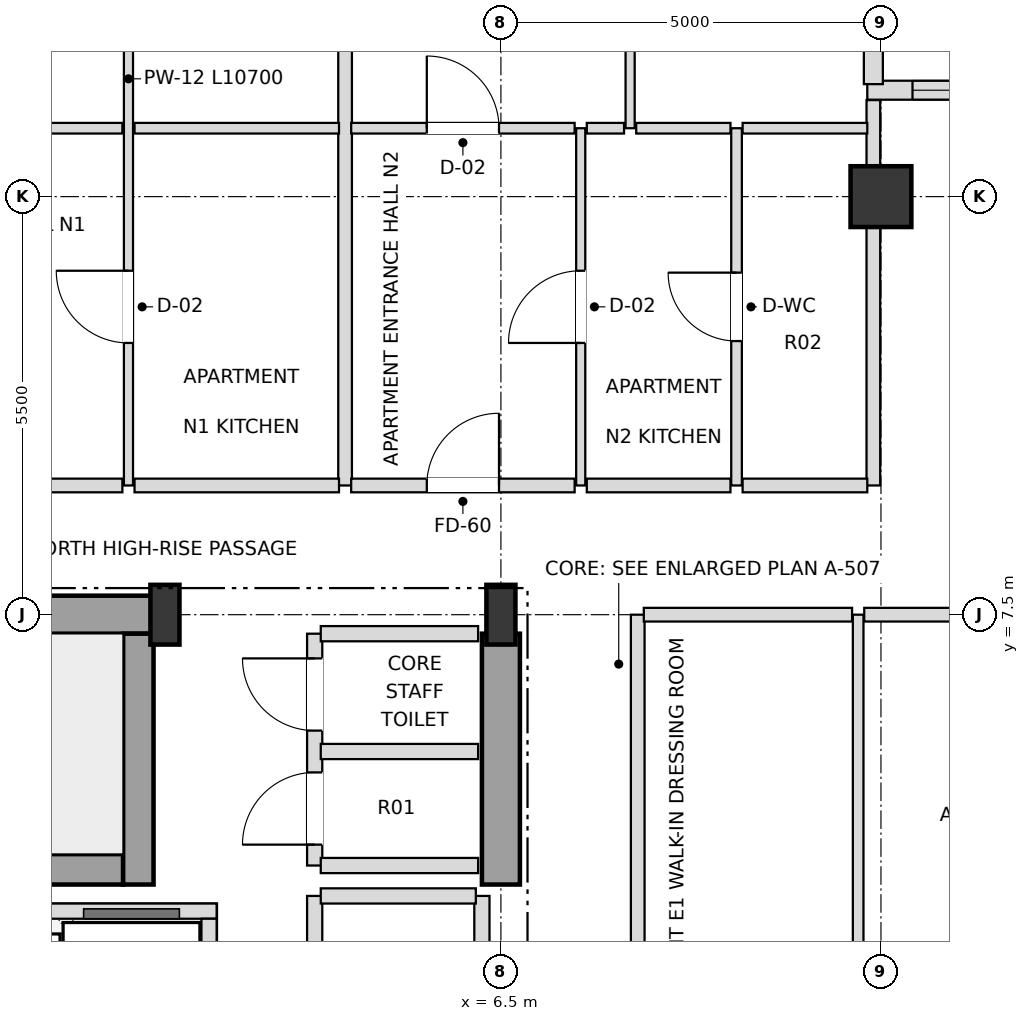
"""IFC4 building model, lengths in metres.
Left out: names, types, materials, properties, quantities, classifications, styles, units other than length and angle.
Written with IfcOpenShell. Run it as: python <this file> out.ifc"""

import sys

from ifc_helpers import new_model, si_unit, direction, frame, frame_2d, origin, origin_2d, place, context, subcontext, project, spatial, rectangle, i_section, extrude, element, fill, save


model = new_model("IFC4")
c1 = context("Model", 3, precision=1e-05, world=origin(), true_north=direction((0.0, 1.0)))
c2 = subcontext(c1, "Body", "Model", "MODEL_VIEW")
j1 = project(units=[si_unit("LENGTHUNIT", "METRE"), si_unit("PLANEANGLEUNIT", "RADIAN")], contexts=[c1])
p1 = place(None, origin())
s1 = spatial("IfcSite", under=j1, at=p1, CompositionType="ELEMENT")
p2 = place(p1, origin())
s2 = spatial("IfcBuilding", under=s1, at=p2, CompositionType="ELEMENT")
p3 = place(p2, frame((0.0, 0.0, 254.7)))
s3 = spatial("IfcBuildingStorey", under=s2, at=p3, CompositionType="ELEMENT", Elevation=254.7)
for number, where, z_axis, x_axis in (
    (1, (2.08, 7.5, 0.0), (0.0, 0.0, 1.0), (1.0, 0.0, 0.0)),
    (2, (6.5, 7.5, 0.0), (0.0, 0.0, 1.0), (1.0, 0.0, 0.0)),
):
    element("IfcColumn", number, at=place(p3, frame(where, z_axis=z_axis, x_axis=x_axis)), inside=s3, PredefinedType="COLUMN", context=c2, shape_type="SweptSolid", body=[
        extrude(i_section(OverallWidth=0.382, OverallDepth=0.786, WebThickness=0.02, FlangeThickness=0.033, at=origin_2d()), origin(), (0.0, 0.0, 1.0), 3.6),
    ])
p4 = place(p3, frame((11.5, 13.0, 0.0), z_axis=(0.0, 0.0, 1.0), x_axis=(1.0, 0.0, 0.0)))
e3 = element("IfcColumn", 3, at=p4, inside=s3, PredefinedType="COLUMN", context=c2, shape_type="SweptSolid", body=[
    extrude(rectangle(XDim=0.8, YDim=0.8, at=origin_2d()), origin(), (0.0, 0.0, 1.0), 3.6),
])
p5 = place(p3, frame((16.98, 14.4, 0.0), z_axis=(0.0, 0.0, 1.0), x_axis=(-1.0, 0.0, 0.0)))
e4 = element("IfcWall", 4, at=p5, inside=s3, PredefinedType="SOLIDWALL", context=c2, shape_type="SweptSolid", body=[
    extrude(rectangle(XDim=5.66, YDim=0.25, at=frame_2d((2.83, 0.0))), origin(), (0.0, 0.0, 1.0), 2.748),
])
p6 = place(p5, frame((0.595, 0.0, 0.72)))
e5 = element("IfcOpeningElement", 5, at=p6, cuts=e4, PredefinedType="OPENING", context=c2, shape_type="SweptSolid", body=[
    extrude(rectangle(XDim=1.8, YDim=1.68, at=frame_2d((0.9, 0.84))), frame((0.0, 0.135, 0.0), z_axis=(0.0, -1.0, 0.0), x_axis=(1.0, 0.0, 0.0)), (0.0, 0.0, 1.0), 0.27),
])
p7 = place(p5, frame((3.265, 0.0, 0.72)))
e6 = element("IfcOpeningElement", 6, at=p7, cuts=e4, PredefinedType="OPENING", context=c2, shape_type="SweptSolid", body=[
    extrude(rectangle(XDim=1.8, YDim=1.68, at=frame_2d((0.9, 0.84))), frame((0.0, 0.135, 0.0), z_axis=(0.0, -1.0, 0.0), x_axis=(1.0, 0.0, 0.0)), (0.0, 0.0, 1.0), 0.27),
])
p8 = place(p3, frame((11.4, 14.48, 0.0), z_axis=(0.0, 0.0, 1.0), x_axis=(0.0, 1.0, 0.0)))
e7 = element("IfcWall", 7, at=p8, inside=s3, PredefinedType="SOLIDWALL", context=c2, shape_type="SweptSolid", body=[
    extrude(rectangle(XDim=5.34, YDim=0.25, at=frame_2d((2.67, 0.0))), origin(), (0.0, 0.0, 1.0), 2.748),
])
p9 = place(p8, frame((1.615, 0.0, 0.72)))
e8 = element("IfcOpeningElement", 8, at=p9, cuts=e7, PredefinedType="OPENING", context=c2, shape_type="SweptSolid", body=[
    extrude(rectangle(XDim=1.8, YDim=1.68, at=frame_2d((0.9, 0.84))), frame((0.0, 0.135, 0.0), z_axis=(0.0, -1.0, 0.0), x_axis=(1.0, 0.0, 0.0)), (0.0, 0.0, 1.0), 0.27),
])
p10 = place(p3, frame((0.0, 7.5, 0.0), z_axis=(0.0, 0.0, 1.0), x_axis=(1.0, 0.0, 0.0)))
e9 = element("IfcWall", 9, at=p10, inside=s3, PredefinedType="SHEAR", context=c2, shape_type="SweptSolid", body=[
    extrude(rectangle(XDim=2.08, YDim=0.5, at=frame_2d((1.04, 0.0))), origin(), (0.0, 0.0, 1.0), 3.38),
])
p11 = place(p3, frame((6.5, 3.95, 0.0), z_axis=(0.0, 0.0, 1.0), x_axis=(0.0, 1.0, 0.0)))
e10 = element("IfcWall", 10, at=p11, inside=s3, PredefinedType="SHEAR", context=c2, shape_type="SweptSolid", body=[
    extrude(rectangle(XDim=3.3, YDim=0.5, at=frame_2d((1.65, 0.0))), origin(), (0.0, 0.0, 1.0), 3.38),
])
p12 = place(p3, frame((-5.55, 4.15, 0.0), z_axis=(0.0, 0.0, 1.0), x_axis=(1.0, 0.0, 0.0)))
e11 = element("IfcWall", 11, at=p12, inside=s3, PredefinedType="SHEAR", context=c2, shape_type="SweptSolid", body=[
    extrude(rectangle(XDim=7.08, YDim=0.4, at=frame_2d((3.54, 0.0))), origin(), (0.0, 0.0, 1.0), 3.38),
])
p13 = place(p3, frame((1.73, 3.95, 0.0), z_axis=(0.0, 0.0, 1.0), x_axis=(0.0, 1.0, 0.0)))
e12 = element("IfcWall", 12, at=p13, inside=s3, PredefinedType="SHEAR", context=c2, shape_type="SweptSolid", body=[
    extrude(rectangle(XDim=3.3, YDim=0.4, at=frame_2d((1.65, 0.0))), origin(), (0.0, 0.0, 1.0), 3.38),
])
p14 = place(p3, frame((-2.82, 3.6, 0.0), z_axis=(0.0, 0.0, 1.0), x_axis=(1.0, 0.0, 0.0)))
e13 = element("IfcWall", 13, at=p14, inside=s3, PredefinedType="SOLIDWALL", context=c2, shape_type="SweptSolid", body=[
    extrude(rectangle(XDim=5.58, YDim=0.2, at=frame_2d((2.79, 0.0))), origin(), (0.0, 0.0, 1.0), 3.38),
])
p15 = place(p3, frame((2.66, 1.0, 0.0), z_axis=(0.0, 0.0, 1.0), x_axis=(0.0, 1.0, 0.0)))
e14 = element("IfcWall", 14, at=p15, inside=s3, PredefinedType="SOLIDWALL", context=c2, shape_type="SweptSolid", body=[
    extrude(rectangle(XDim=2.5, YDim=0.2, at=frame_2d((1.25, 0.0))), origin(), (0.0, 0.0, 1.0), 3.38),
])
p16 = place(p3, frame((1.6, 9.2, 0.0), z_axis=(0.0, 0.0, 1.0), x_axis=(0.0, 1.0, 0.0)))
e15 = element("IfcWall", 15, at=p16, inside=s3, PredefinedType="PARTITIONING", context=c2, shape_type="SweptSolid", body=[
    extrude(rectangle(XDim=10.7, YDim=0.12, at=frame_2d((5.35, 0.0))), origin(), (0.0, 0.0, 1.0), 3.018),
])
p17 = place(p16, frame((1.875, 0.0, 0.0)))
e16 = element("IfcOpeningElement", 16, at=p17, cuts=e15, PredefinedType="OPENING", context=c2, shape_type="SweptSolid", body=[
    extrude(rectangle(XDim=0.95, YDim=2.1, at=frame_2d((0.475, 1.05))), frame((0.0, 0.07, 0.0), z_axis=(0.0, -1.0, 0.0), x_axis=(1.0, 0.0, 0.0)), (0.0, 0.0, 1.0), 0.14),
])
p18 = place(p16, frame((7.25, 0.0, 0.0)))
e17 = element("IfcOpeningElement", 17, at=p18, cuts=e15, PredefinedType="OPENING", context=c2, shape_type="SweptSolid", body=[
    extrude(rectangle(XDim=0.9, YDim=2.1, at=frame_2d((0.45, 1.05))), frame((0.0, 0.07, 0.0), z_axis=(0.0, -1.0, 0.0), x_axis=(1.0, 0.0, 0.0)), (0.0, 0.0, 1.0), 0.14),
])
p19 = place(p3, frame((4.05, -1.35, 0.0), z_axis=(0.0, 0.0, 1.0), x_axis=(0.0, 1.0, 0.0)))
e18 = element("IfcWall", 18, at=p19, inside=s3, PredefinedType="SOLIDWALL", context=c2, shape_type="SweptSolid", body=[
    extrude(rectangle(XDim=5.15, YDim=0.2, at=frame_2d((2.575, 0.0))), origin(), (0.0, 0.0, 1.0), 3.38),
])
p20 = place(p19, frame((0.475, 0.0, 0.0)))
e19 = element("IfcOpeningElement", 19, at=p20, cuts=e18, PredefinedType="OPENING", context=c2, shape_type="SweptSolid", body=[
    extrude(rectangle(XDim=0.95, YDim=2.15, at=frame_2d((0.475, 1.075))), frame((0.0, 0.11, 0.0), z_axis=(0.0, -1.0, 0.0), x_axis=(1.0, 0.0, 0.0)), (0.0, 0.0, 1.0), 0.22),
])
p21 = place(p19, frame((3.025, 0.0, 0.0)))
e20 = element("IfcOpeningElement", 20, at=p21, cuts=e18, PredefinedType="OPENING", context=c2, shape_type="SweptSolid", body=[
    extrude(rectangle(XDim=0.95, YDim=2.15, at=frame_2d((0.475, 1.075))), frame((0.0, 0.11, 0.0), z_axis=(0.0, -1.0, 0.0), x_axis=(1.0, 0.0, 0.0)), (0.0, 0.0, 1.0), 0.22),
])
p22 = place(p3, frame((4.05, 4.2, 0.0), z_axis=(0.0, 0.0, 1.0), x_axis=(0.0, 1.0, 0.0)))
e21 = element("IfcWall", 21, at=p22, inside=s3, PredefinedType="SOLIDWALL", context=c2, shape_type="SweptSolid", body=[
    extrude(rectangle(XDim=3.05, YDim=0.2, at=frame_2d((1.525, 0.0))), origin(), (0.0, 0.0, 1.0), 3.38),
])
p23 = place(p22, frame((0.275, 0.0, 0.0)))
e22 = element("IfcOpeningElement", 22, at=p23, cuts=e21, PredefinedType="OPENING", context=c2, shape_type="SweptSolid", body=[
    extrude(rectangle(XDim=0.95, YDim=2.15, at=frame_2d((0.475, 1.075))), frame((0.0, 0.11, 0.0), z_axis=(0.0, -1.0, 0.0), x_axis=(1.0, 0.0, 0.0)), (0.0, 0.0, 1.0), 0.22),
])
p24 = place(p22, frame((1.775, 0.0, 0.0)))
e23 = element("IfcOpeningElement", 23, at=p24, cuts=e21, PredefinedType="OPENING", context=c2, shape_type="SweptSolid", body=[
    extrude(rectangle(XDim=0.95, YDim=2.15, at=frame_2d((0.475, 1.075))), frame((0.0, 0.11, 0.0), z_axis=(0.0, -1.0, 0.0), x_axis=(1.0, 0.0, 0.0)), (0.0, 0.0, 1.0), 0.22),
])
p25 = place(p3, frame((4.45, 9.2, 0.0), z_axis=(0.0, 0.0, 1.0), x_axis=(0.0, 1.0, 0.0)))
e24 = element("IfcWall", 24, at=p25, inside=s3, PredefinedType="PARTITIONING", context=c2, shape_type="SweptSolid", body=[
    extrude(rectangle(XDim=10.7, YDim=0.18, at=frame_2d((5.35, 0.0))), origin(), (0.0, 0.0, 1.0), 3.018),
])
p26 = place(p3, frame((6.25, -1.35, 0.0), z_axis=(0.0, 0.0, 1.0), x_axis=(0.0, 1.0, 0.0)))
e25 = element("IfcWall", 25, at=p26, inside=s3, PredefinedType="SOLIDWALL", context=c2, shape_type="SweptSolid", body=[
    extrude(rectangle(XDim=5.15, YDim=0.2, at=frame_2d((2.575, 0.0))), origin(), (0.0, 0.0, 1.0), 3.38),
])
p27 = place(p3, frame((7.55, 9.2, 0.0), z_axis=(0.0, 0.0, 1.0), x_axis=(0.0, 1.0, 0.0)))
e26 = element("IfcWall", 26, at=p27, inside=s3, PredefinedType="PARTITIONING", context=c2, shape_type="SweptSolid", body=[
    extrude(rectangle(XDim=4.7, YDim=0.12, at=frame_2d((2.35, 0.0))), origin(), (0.0, 0.0, 1.0), 2.826),
])
p28 = place(p27, frame((1.875, 0.0, 0.0)))
e27 = element("IfcOpeningElement", 27, at=p28, cuts=e26, PredefinedType="OPENING", context=c2, shape_type="SweptSolid", body=[
    extrude(rectangle(XDim=0.95, YDim=2.1, at=frame_2d((0.475, 1.05))), frame((0.0, 0.07, 0.0), z_axis=(0.0, -1.0, 0.0), x_axis=(1.0, 0.0, 0.0)), (0.0, 0.0, 1.0), 0.14),
])
p29 = place(p3, frame((8.2, 13.9, 0.0), z_axis=(0.0, 0.0, 1.0), x_axis=(0.0, 1.0, 0.0)))
e28 = element("IfcWall", 28, at=p29, inside=s3, PredefinedType="PARTITIONING", context=c2, shape_type="SweptSolid", body=[
    extrude(rectangle(XDim=6.0, YDim=0.12, at=frame_2d((3.0, 0.0))), origin(), (0.0, 0.0, 1.0), 3.38),
])
p30 = place(p29, frame((2.55, 0.0, 0.0)))
e29 = element("IfcOpeningElement", 29, at=p30, cuts=e28, PredefinedType="OPENING", context=c2, shape_type="SweptSolid", body=[
    extrude(rectangle(XDim=0.9, YDim=2.1, at=frame_2d((0.45, 1.05))), frame((0.0, 0.07, 0.0), z_axis=(0.0, -1.0, 0.0), x_axis=(1.0, 0.0, 0.0)), (0.0, 0.0, 1.0), 0.14),
])
p31 = place(p3, frame((8.3, -7.5, 0.0), z_axis=(0.0, 0.0, 1.0), x_axis=(0.0, 1.0, 0.0)))
e30 = element("IfcWall", 30, at=p31, inside=s3, PredefinedType="PARTITIONING", context=c2, shape_type="SweptSolid", body=[
    extrude(rectangle(XDim=15.0, YDim=0.18, at=frame_2d((7.5, 0.0))), origin(), (0.0, 0.0, 1.0), 3.38),
])
p32 = place(p31, frame((2.355, 0.0, 0.0)))
e31 = element("IfcOpeningElement", 31, at=p32, cuts=e30, PredefinedType="OPENING", context=c2, shape_type="SweptSolid", body=[
    extrude(rectangle(XDim=0.95, YDim=2.15, at=frame_2d((0.475, 1.075))), frame((0.0, 0.1, 0.0), z_axis=(0.0, -1.0, 0.0), x_axis=(1.0, 0.0, 0.0)), (0.0, 0.0, 1.0), 0.2),
])
p33 = place(p3, frame((9.6, 9.2, 0.0), z_axis=(0.0, 0.0, 1.0), x_axis=(0.0, 1.0, 0.0)))
e32 = element("IfcWall", 32, at=p33, inside=s3, PredefinedType="PARTITIONING", context=c2, shape_type="SweptSolid", body=[
    extrude(rectangle(XDim=4.7, YDim=0.14, at=frame_2d((2.35, 0.0))), origin(), (0.0, 0.0, 1.0), 2.826),
])
p34 = place(p33, frame((1.9, 0.0, 0.0)))
e33 = element("IfcOpeningElement", 33, at=p34, cuts=e32, PredefinedType="OPENING", context=c2, shape_type="SweptSolid", body=[
    extrude(rectangle(XDim=0.9, YDim=2.1, at=frame_2d((0.45, 1.05))), frame((0.0, 0.08, 0.0), z_axis=(0.0, -1.0, 0.0), x_axis=(1.0, 0.0, 0.0)), (0.0, 0.0, 1.0), 0.16),
])
p35 = place(p3, frame((11.2, -7.5, 0.0), z_axis=(0.0, 0.0, 1.0), x_axis=(0.0, 1.0, 0.0)))
e34 = element("IfcWall", 34, at=p35, inside=s3, PredefinedType="PARTITIONING", context=c2, shape_type="SweptSolid", body=[
    extrude(rectangle(XDim=15.0, YDim=0.14, at=frame_2d((7.5, 0.0))), origin(), (0.0, 0.0, 1.0), 3.38),
])
p36 = place(p35, frame((3.475, 0.0, 0.0)))
e35 = element("IfcOpeningElement", 35, at=p36, cuts=e34, PredefinedType="OPENING", context=c2, shape_type="SweptSolid", body=[
    extrude(rectangle(XDim=0.95, YDim=2.1, at=frame_2d((0.475, 1.05))), frame((0.0, 0.08, 0.0), z_axis=(0.0, -1.0, 0.0), x_axis=(1.0, 0.0, 0.0)), (0.0, 0.0, 1.0), 0.16),
])
p37 = place(p3, frame((11.4, 9.2, 0.0), z_axis=(0.0, 0.0, 1.0), x_axis=(0.0, 1.0, 0.0)))
e36 = element("IfcWall", 36, at=p37, inside=s3, PredefinedType="PARTITIONING", context=c2, shape_type="SweptSolid", body=[
    extrude(rectangle(XDim=5.07, YDim=0.18, at=frame_2d((2.535, 0.0))), origin(), (0.0, 0.0, 1.0), 2.748),
])
p38 = place(p3, frame((4.13, 3.8, 0.0), z_axis=(0.0, 0.0, 1.0), x_axis=(1.0, 0.0, 0.0)))
e37 = element("IfcWall", 37, at=p38, inside=s3, PredefinedType="SOLIDWALL", context=c2, shape_type="SweptSolid", body=[
    extrude(rectangle(XDim=2.04, YDim=0.2, at=frame_2d((1.02, 0.0))), origin(), (0.0, 0.0, 1.0), 3.38),
])
for number, where, z_axis, x_axis in (
    (38, (4.13, 4.2, 0.0), (0.0, 0.0, 1.0), (1.0, 0.0, 0.0)),
    (39, (4.13, 5.7, 0.0), (0.0, 0.0, 1.0), (1.0, 0.0, 0.0)),
    (40, (4.13, 7.25, 0.0), (0.0, 0.0, 1.0), (1.0, 0.0, 0.0)),
):
    element("IfcWall", number, at=place(p3, frame(where, z_axis=z_axis, x_axis=x_axis)), inside=s3, PredefinedType="SOLIDWALL", context=c2, shape_type="SweptSolid", body=[
        extrude(rectangle(XDim=2.07, YDim=0.2, at=frame_2d((1.035, 0.0))), origin(), (0.0, 0.0, 1.0), 3.38),
    ])
p39 = place(p3, frame((8.38, 7.5, 0.0), z_axis=(0.0, 0.0, 1.0), x_axis=(1.0, 0.0, 0.0)))
e41 = element("IfcWall", 41, at=p39, inside=s3, PredefinedType="PARTITIONING", context=c2, shape_type="SweptSolid", body=[
    extrude(rectangle(XDim=2.74, YDim=0.18, at=frame_2d((1.37, 0.0))), origin(), (0.0, 0.0, 1.0), 2.826),
])
p40 = place(p3, frame((11.28, 7.5, 0.0), z_axis=(0.0, 0.0, 1.0), x_axis=(1.0, 0.0, 0.0)))
e42 = element("IfcWall", 42, at=p40, inside=s3, PredefinedType="PARTITIONING", context=c2, shape_type="SweptSolid", body=[
    extrude(rectangle(XDim=5.62, YDim=0.18, at=frame_2d((2.81, 0.0))), origin(), (0.0, 0.0, 1.0), 2.826),
])
p41 = place(p3, frame((-4.47, 9.2, 0.0), z_axis=(0.0, 0.0, 1.0), x_axis=(1.0, 0.0, 0.0)))
e43 = element("IfcWall", 43, at=p41, inside=s3, PredefinedType="PARTITIONING", context=c2, shape_type="SweptSolid", body=[
    extrude(rectangle(XDim=5.99, YDim=0.18, at=frame_2d((2.995, 0.0))), origin(), (0.0, 0.0, 1.0), 3.38),
])
p42 = place(p41, frame((2.525, 0.0, 0.0)))
e44 = element("IfcOpeningElement", 44, at=p42, cuts=e43, PredefinedType="OPENING", context=c2, shape_type="SweptSolid", body=[
    extrude(rectangle(XDim=0.95, YDim=2.15, at=frame_2d((0.475, 1.075))), frame((0.0, 0.1, 0.0), z_axis=(0.0, -1.0, 0.0), x_axis=(1.0, 0.0, 0.0)), (0.0, 0.0, 1.0), 0.2),
])
p43 = place(p3, frame((1.68, 9.2, 0.0), z_axis=(0.0, 0.0, 1.0), x_axis=(1.0, 0.0, 0.0)))
e45 = element("IfcWall", 45, at=p43, inside=s3, PredefinedType="PARTITIONING", context=c2, shape_type="SweptSolid", body=[
    extrude(rectangle(XDim=2.69, YDim=0.18, at=frame_2d((1.345, 0.0))), origin(), (0.0, 0.0, 1.0), 3.38),
])
p44 = place(p3, frame((4.53, 9.2, 0.0), z_axis=(0.0, 0.0, 1.0), x_axis=(1.0, 0.0, 0.0)))
e46 = element("IfcWall", 46, at=p44, inside=s3, PredefinedType="PARTITIONING", context=c2, shape_type="SweptSolid", body=[
    extrude(rectangle(XDim=2.94, YDim=0.18, at=frame_2d((1.47, 0.0))), origin(), (0.0, 0.0, 1.0), 2.826),
])
p45 = place(p44, frame((0.995, 0.0, 0.0)))
e47 = element("IfcOpeningElement", 47, at=p45, cuts=e46, PredefinedType="OPENING", context=c2, shape_type="SweptSolid", body=[
    extrude(rectangle(XDim=0.95, YDim=2.15, at=frame_2d((0.475, 1.075))), frame((0.0, 0.1, 0.0), z_axis=(0.0, -1.0, 0.0), x_axis=(1.0, 0.0, 0.0)), (0.0, 0.0, 1.0), 0.2),
])
p46 = place(p3, frame((7.63, 9.2, 0.0), z_axis=(0.0, 0.0, 1.0), x_axis=(1.0, 0.0, 0.0)))
e48 = element("IfcWall", 48, at=p46, inside=s3, PredefinedType="PARTITIONING", context=c2, shape_type="SweptSolid", body=[
    extrude(rectangle(XDim=1.89, YDim=0.18, at=frame_2d((0.945, 0.0))), origin(), (0.0, 0.0, 1.0), 3.38),
])
p47 = place(p3, frame((9.68, 9.2, 0.0), z_axis=(0.0, 0.0, 1.0), x_axis=(1.0, 0.0, 0.0)))
e49 = element("IfcWall", 49, at=p47, inside=s3, PredefinedType="PARTITIONING", context=c2, shape_type="SweptSolid", body=[
    extrude(rectangle(XDim=1.64, YDim=0.18, at=frame_2d((0.82, 0.0))), origin(), (0.0, 0.0, 1.0), 3.38),
])
p48 = place(p3, frame((-2.02, 13.9, 0.0), z_axis=(0.0, 0.0, 1.0), x_axis=(1.0, 0.0, 0.0)))
e50 = element("IfcWall", 50, at=p48, inside=s3, PredefinedType="PARTITIONING", context=c2, shape_type="SweptSolid", body=[
    extrude(rectangle(XDim=3.54, YDim=0.14, at=frame_2d((1.77, 0.0))), origin(), (0.0, 0.0, 1.0), 3.38),
])
p49 = place(p3, frame((1.68, 13.9, 0.0), z_axis=(0.0, 0.0, 1.0), x_axis=(1.0, 0.0, 0.0)))
e51 = element("IfcWall", 51, at=p49, inside=s3, PredefinedType="PARTITIONING", context=c2, shape_type="SweptSolid", body=[
    extrude(rectangle(XDim=2.69, YDim=0.14, at=frame_2d((1.345, 0.0))), origin(), (0.0, 0.0, 1.0), 3.38),
])
p50 = place(p3, frame((4.53, 13.9, 0.0), z_axis=(0.0, 0.0, 1.0), x_axis=(1.0, 0.0, 0.0)))
e52 = element("IfcWall", 52, at=p50, inside=s3, PredefinedType="PARTITIONING", context=c2, shape_type="SweptSolid", body=[
    extrude(rectangle(XDim=2.94, YDim=0.14, at=frame_2d((1.47, 0.0))), origin(), (0.0, 0.0, 1.0), 2.826),
])
p51 = place(p50, frame((0.995, 0.0, 0.0)))
e53 = element("IfcOpeningElement", 53, at=p51, cuts=e52, PredefinedType="OPENING", context=c2, shape_type="SweptSolid", body=[
    extrude(rectangle(XDim=0.95, YDim=2.1, at=frame_2d((0.475, 1.05))), frame((0.0, 0.08, 0.0), z_axis=(0.0, -1.0, 0.0), x_axis=(1.0, 0.0, 0.0)), (0.0, 0.0, 1.0), 0.16),
])
p52 = place(p3, frame((7.63, 13.9, 0.0), z_axis=(0.0, 0.0, 1.0), x_axis=(1.0, 0.0, 0.0)))
e54 = element("IfcWall", 54, at=p52, inside=s3, PredefinedType="PARTITIONING", context=c2, shape_type="SweptSolid", body=[
    extrude(rectangle(XDim=0.49, YDim=0.14, at=frame_2d((0.245, 0.0))), origin(), (0.0, 0.0, 1.0), 3.38),
])
p53 = place(p3, frame((8.28, 13.9, 0.0), z_axis=(0.0, 0.0, 1.0), x_axis=(1.0, 0.0, 0.0)))
e55 = element("IfcWall", 55, at=p53, inside=s3, PredefinedType="PARTITIONING", context=c2, shape_type="SweptSolid", body=[
    extrude(rectangle(XDim=1.24, YDim=0.14, at=frame_2d((0.62, 0.0))), origin(), (0.0, 0.0, 1.0), 3.38),
])
p54 = place(p3, frame((9.68, 13.9, 0.0), z_axis=(0.0, 0.0, 1.0), x_axis=(1.0, 0.0, 0.0)))
e56 = element("IfcWall", 56, at=p54, inside=s3, PredefinedType="PARTITIONING", context=c2, shape_type="SweptSolid", body=[
    extrude(rectangle(XDim=1.64, YDim=0.14, at=frame_2d((0.82, 0.0))), origin(), (0.0, 0.0, 1.0), 3.38),
])
p55 = place(p7, origin())
e57 = element("IfcWindow", 57, at=p55, inside=s3, PartitioningType="SINGLE_PANEL", PredefinedType="WINDOW", context=c2, shape_type="SweptSolid", body=[
    extrude(rectangle(XDim=1.8, YDim=1.68, at=frame_2d((0.9, 0.84))), frame((0.0, 0.03, 0.0), z_axis=(0.0, -1.0, 0.0), x_axis=(1.0, 0.0, 0.0)), (0.0, 0.0, 1.0), 0.06),
])
fill(e6, e57)
p56 = place(p23, origin())
e58 = element("IfcDoor", 58, at=p56, inside=s3, OperationType="SINGLE_SWING_LEFT", PredefinedType="DOOR", context=c2, shape_type="SweptSolid", body=[
    extrude(rectangle(XDim=0.95, YDim=2.15, at=frame_2d((0.475, 1.075))), frame((0.0, 0.025, 0.0), z_axis=(0.0, -1.0, 0.0), x_axis=(1.0, 0.0, 0.0)), (0.0, 0.0, 1.0), 0.05),
])
fill(e22, e58)
p57 = place(p24, origin())
e59 = element("IfcDoor", 59, at=p57, inside=s3, OperationType="SINGLE_SWING_RIGHT", PredefinedType="DOOR", context=c2, shape_type="SweptSolid", body=[
    extrude(rectangle(XDim=0.95, YDim=2.15, at=frame_2d((0.475, 1.075))), frame((0.0, 0.025, 0.0), z_axis=(0.0, -1.0, 0.0), x_axis=(1.0, 0.0, 0.0)), (0.0, 0.0, 1.0), 0.05),
])
fill(e23, e59)
p58 = place(p17, origin())
e60 = element("IfcDoor", 60, at=p58, inside=s3, OperationType="SINGLE_SWING_RIGHT", PredefinedType="DOOR", context=c2, shape_type="SweptSolid", body=[
    extrude(rectangle(XDim=0.95, YDim=2.1, at=frame_2d((0.475, 1.05))), frame((0.0, 0.025, 0.0), z_axis=(0.0, -1.0, 0.0), x_axis=(1.0, 0.0, 0.0)), (0.0, 0.0, 1.0), 0.05),
])
fill(e16, e60)
p59 = place(p45, origin())
e61 = element("IfcDoor", 61, at=p59, inside=s3, OperationType="SINGLE_SWING_RIGHT", PredefinedType="DOOR", context=c2, shape_type="SweptSolid", body=[
    extrude(rectangle(XDim=0.95, YDim=2.15, at=frame_2d((0.475, 1.075))), frame((0.0, 0.025, 0.0), z_axis=(0.0, -1.0, 0.0), x_axis=(1.0, 0.0, 0.0)), (0.0, 0.0, 1.0), 0.05),
])
fill(e47, e61)
p60 = place(p28, origin())
e62 = element("IfcDoor", 62, at=p60, inside=s3, OperationType="SINGLE_SWING_LEFT", PredefinedType="DOOR", context=c2, shape_type="SweptSolid", body=[
    extrude(rectangle(XDim=0.95, YDim=2.1, at=frame_2d((0.475, 1.05))), frame((0.0, 0.025, 0.0), z_axis=(0.0, -1.0, 0.0), x_axis=(1.0, 0.0, 0.0)), (0.0, 0.0, 1.0), 0.05),
])
fill(e27, e62)
p61 = place(p34, origin())
e63 = element("IfcDoor", 63, at=p61, inside=s3, OperationType="SINGLE_SWING_RIGHT", PredefinedType="DOOR", context=c2, shape_type="SweptSolid", body=[
    extrude(rectangle(XDim=0.9, YDim=2.1, at=frame_2d((0.45, 1.05))), frame((0.0, 0.025, 0.0), z_axis=(0.0, -1.0, 0.0), x_axis=(1.0, 0.0, 0.0)), (0.0, 0.0, 1.0), 0.05),
])
fill(e33, e63)
p62 = place(p51, origin())
e64 = element("IfcDoor", 64, at=p62, inside=s3, OperationType="SINGLE_SWING_LEFT", PredefinedType="DOOR", context=c2, shape_type="SweptSolid", body=[
    extrude(rectangle(XDim=0.95, YDim=2.1, at=frame_2d((0.475, 1.05))), frame((0.0, 0.025, 0.0), z_axis=(0.0, -1.0, 0.0), x_axis=(1.0, 0.0, 0.0)), (0.0, 0.0, 1.0), 0.05),
])
fill(e53, e64)
save(model, sys.argv[1])
